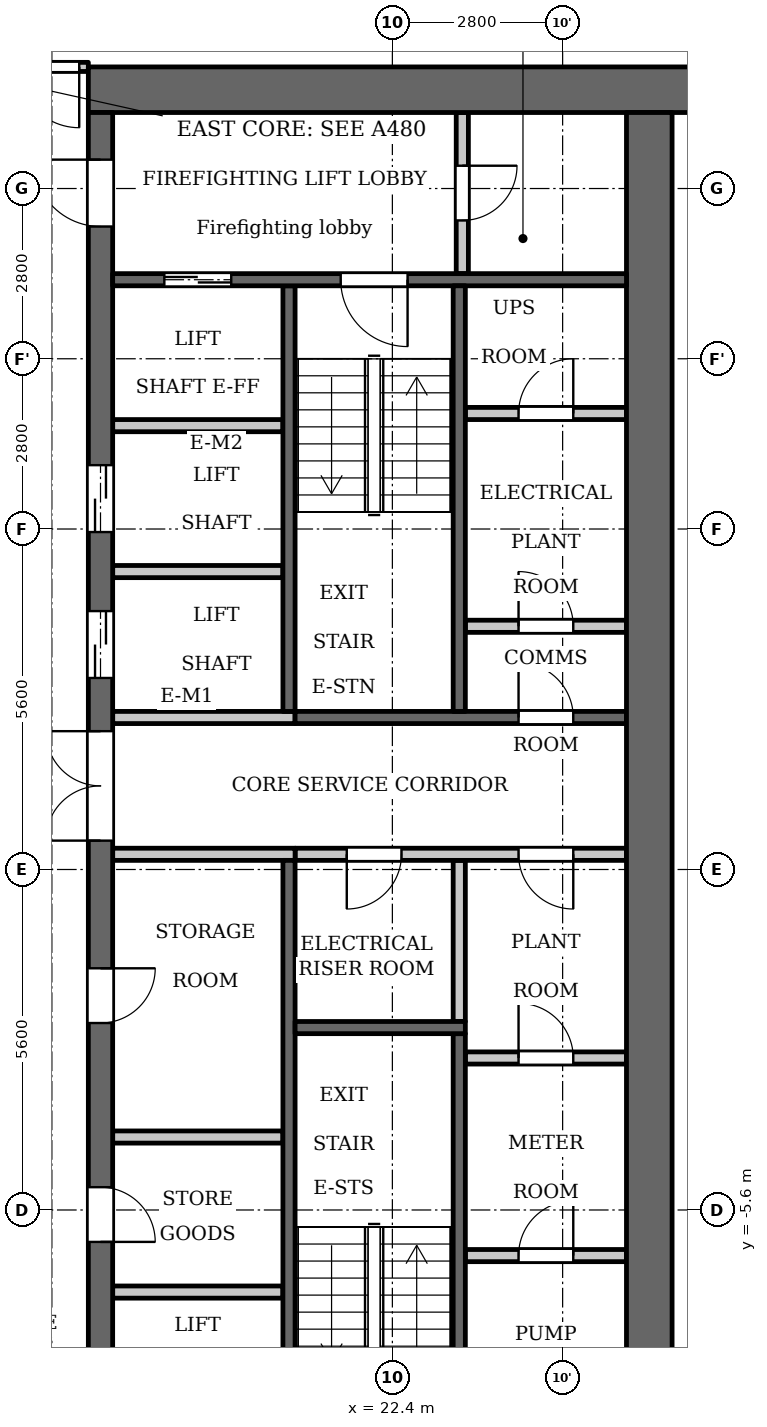
"""IFC4 building model, lengths in metres.
Left out: names, types, materials, properties, quantities, classifications, styles, units other than length and angle.
Written with IfcOpenShell. Run it as: python <this file> out.ifc"""

import sys

from ifc_helpers import new_model, si_unit, direction, frame, frame_2d, origin, place, context, subcontext, project, spatial, rectangle, extrude, element, fill, save


model = new_model("IFC4")
c1 = context("Model", 3, precision=1e-05, world=origin(), true_north=direction((0.0, 1.0)))
c2 = subcontext(c1, "Body", "Model", "MODEL_VIEW")
j1 = project(units=[si_unit("LENGTHUNIT", "METRE"), si_unit("PLANEANGLEUNIT", "RADIAN")], contexts=[c1])
p1 = place(None, origin())
s1 = spatial("IfcSite", under=j1, at=p1, CompositionType="ELEMENT")
p2 = place(p1, origin())
s2 = spatial("IfcBuilding", under=s1, at=p2, CompositionType="ELEMENT")
p3 = place(p2, frame((0.0, 0.0, 150.1)))
s3 = spatial("IfcBuildingStorey", under=s2, at=p3, CompositionType="ELEMENT", Elevation=150.1)
p4 = place(p3, frame((23.5, -2.5, 0.0), z_axis=(0.0, 0.0, 1.0), x_axis=(0.0, 1.0, 0.0)))
e1 = element("IfcWall", 1, at=p4, inside=s3, PredefinedType="PARTITIONING", context=c2, shape_type="SweptSolid", body=[
    extrude(rectangle(XDim=2.65, YDim=0.2, at=frame_2d((1.325, 0.0))), origin(), (0.0, 0.0, 1.0), 3.2),
])
p5 = place(p3, frame((20.7, 2.6, 0.0), z_axis=(0.0, 0.0, 1.0), x_axis=(0.0, 1.0, 0.0)))
e2 = element("IfcWall", 2, at=p5, inside=s3, PredefinedType="SHEAR", context=c2, shape_type="SweptSolid", body=[
    extrude(rectangle(XDim=7.0, YDim=0.2, at=frame_2d((3.5, 0.0))), origin(), (0.0, 0.0, 1.0), 3.2),
])
p6 = place(p3, frame((20.7, -9.6, 0.0), z_axis=(0.0, 0.0, 1.0), x_axis=(0.0, 1.0, 0.0)))
e3 = element("IfcWall", 3, at=p6, inside=s3, PredefinedType="SHEAR", context=c2, shape_type="SweptSolid", body=[
    extrude(rectangle(XDim=9.75, YDim=0.2, at=frame_2d((4.875, 0.0))), origin(), (0.0, 0.0, 1.0), 3.2),
])
p7 = place(p3, frame((20.8, 2.5, 0.0), z_axis=(0.0, 0.0, 1.0), x_axis=(1.0, 0.0, 0.0)))
e4 = element("IfcWall", 4, at=p7, inside=s3, PredefinedType="SHEAR", context=c2, shape_type="SweptSolid", body=[
    extrude(rectangle(XDim=5.45, YDim=0.2, at=frame_2d((2.725, 0.0))), origin(), (0.0, 0.0, 1.0), 3.2),
])
p8 = place(p7, frame((3.675, 0.0, 0.0)))
e5 = element("IfcOpeningElement", 5, at=p8, cuts=e4, PredefinedType="OPENING", context=c2, shape_type="SweptSolid", body=[
    extrude(rectangle(XDim=0.9, YDim=2.1, at=frame_2d((0.45, 1.05))), frame((0.0, 0.11, 0.0), z_axis=(0.0, -1.0, 0.0), x_axis=(1.0, 0.0, 0.0)), (0.0, 0.0, 1.0), 0.22),
])
p9 = place(p3, frame((20.8, 0.25, 0.0), z_axis=(0.0, 0.0, 1.0), x_axis=(1.0, 0.0, 0.0)))
e6 = element("IfcWall", 6, at=p9, inside=s3, PredefinedType="PARTITIONING", context=c2, shape_type="SweptSolid", body=[
    extrude(rectangle(XDim=5.45, YDim=0.2, at=frame_2d((2.725, 0.0))), origin(), (0.0, 0.0, 1.0), 3.2),
])
p10 = place(p9, frame((0.85, 0.0, 0.0)))
e7 = element("IfcOpeningElement", 7, at=p10, cuts=e6, PredefinedType="OPENING", context=c2, shape_type="SweptSolid", body=[
    extrude(rectangle(XDim=0.9, YDim=2.1, at=frame_2d((0.45, 1.05))), frame((0.0, 0.11, 0.0), z_axis=(0.0, -1.0, 0.0), x_axis=(1.0, 0.0, 0.0)), (0.0, 0.0, 1.0), 0.22),
])
p11 = place(p9, frame((3.675, 0.0, 0.0)))
e8 = element("IfcOpeningElement", 8, at=p11, cuts=e6, PredefinedType="OPENING", context=c2, shape_type="SweptSolid", body=[
    extrude(rectangle(XDim=0.9, YDim=2.1, at=frame_2d((0.45, 1.05))), frame((0.0, 0.11, 0.0), z_axis=(0.0, -1.0, 0.0), x_axis=(1.0, 0.0, 0.0)), (0.0, 0.0, 1.0), 0.22),
])
p12 = place(p3, frame((17.4, 12.825, 0.0), z_axis=(0.0, 0.0, 1.0), x_axis=(1.0, 0.0, 0.0)))
e9 = element("IfcWall", 9, at=p12, inside=s3, PredefinedType="SHEAR", context=c2, shape_type="SweptSolid", body=[
    extrude(rectangle(XDim=10.4, YDim=0.75, at=frame_2d((5.2, 0.0))), origin(), (0.0, 0.0, 1.0), 3.2),
])
p13 = place(p3, frame((17.8, -4.4, 0.0), z_axis=(0.0, 0.0, 1.0), x_axis=(1.0, 0.0, 0.0)))
e10 = element("IfcWall", 10, at=p13, inside=s3, PredefinedType="PARTITIONING", context=c2, shape_type="SweptSolid", body=[
    extrude(rectangle(XDim=2.8, YDim=0.2, at=frame_2d((1.4, 0.0))), origin(), (0.0, 0.0, 1.0), 3.2),
])
p14 = place(p3, frame((17.6, -12.45, 0.0), z_axis=(0.0, 0.0, 1.0), x_axis=(0.0, 1.0, 0.0)))
e11 = element("IfcWall", 11, at=p14, inside=s3, PredefinedType="SHEAR", context=c2, shape_type="SweptSolid", body=[
    extrude(rectangle(XDim=24.9, YDim=0.4, at=frame_2d((12.45, 0.0))), origin(), (0.0, 0.0, 1.0), 3.2),
])
p15 = place(p14, frame((6.325, 0.0, 0.0)))
e12 = element("IfcOpeningElement", 12, at=p15, cuts=e11, PredefinedType="OPENING", context=c2, shape_type="SweptSolid", body=[
    extrude(rectangle(XDim=0.9, YDim=2.1, at=frame_2d((0.45, 1.05))), frame((0.0, 0.21, 0.0), z_axis=(0.0, -1.0, 0.0), x_axis=(1.0, 0.0, 0.0)), (0.0, 0.0, 1.0), 0.42),
])
p16 = place(p14, frame((9.925, 0.0, 0.0)))
e13 = element("IfcOpeningElement", 13, at=p16, cuts=e11, PredefinedType="OPENING", context=c2, shape_type="SweptSolid", body=[
    extrude(rectangle(XDim=0.9, YDim=2.1, at=frame_2d((0.45, 1.05))), frame((0.0, 0.21, 0.0), z_axis=(0.0, -1.0, 0.0), x_axis=(1.0, 0.0, 0.0)), (0.0, 0.0, 1.0), 0.42),
])
p17 = place(p14, frame((15.6, 0.0, 0.0)))
e14 = element("IfcOpeningElement", 14, at=p17, cuts=e11, PredefinedType="OPENING", context=c2, shape_type="SweptSolid", body=[
    extrude(rectangle(XDim=1.1, YDim=2.1, at=frame_2d((0.55, 1.05))), frame((0.0, 0.21, 0.0), z_axis=(0.0, -1.0, 0.0), x_axis=(1.0, 0.0, 0.0)), (0.0, 0.0, 1.0), 0.42),
])
p18 = place(p14, frame((18.0, 0.0, 0.0)))
e15 = element("IfcOpeningElement", 15, at=p18, cuts=e11, PredefinedType="OPENING", context=c2, shape_type="SweptSolid", body=[
    extrude(rectangle(XDim=1.1, YDim=2.1, at=frame_2d((0.55, 1.05))), frame((0.0, 0.21, 0.0), z_axis=(0.0, -1.0, 0.0), x_axis=(1.0, 0.0, 0.0)), (0.0, 0.0, 1.0), 0.42),
])
p19 = place(p14, frame((23.025, 0.0, 0.0)))
e16 = element("IfcOpeningElement", 16, at=p19, cuts=e11, PredefinedType="OPENING", context=c2, shape_type="SweptSolid", body=[
    extrude(rectangle(XDim=1.1, YDim=2.1, at=frame_2d((0.55, 1.05))), frame((0.0, 0.21, 0.0), z_axis=(0.0, -1.0, 0.0), x_axis=(1.0, 0.0, 0.0)), (0.0, 0.0, 1.0), 0.42),
])
p20 = place(p14, frame((0.775, 0.0, 0.0)))
e17 = element("IfcOpeningElement", 17, at=p20, cuts=e11, PredefinedType="OPENING", context=c2, shape_type="SweptSolid", body=[
    extrude(rectangle(XDim=1.1, YDim=2.1, at=frame_2d((0.55, 1.05))), frame((0.0, 0.21, 0.0), z_axis=(0.0, -1.0, 0.0), x_axis=(1.0, 0.0, 0.0)), (0.0, 0.0, 1.0), 0.42),
])
p21 = place(p14, frame((12.925, 0.0, 0.0)))
e18 = element("IfcOpeningElement", 18, at=p21, cuts=e11, PredefinedType="OPENING", context=c2, shape_type="SweptSolid", body=[
    extrude(rectangle(XDim=1.8, YDim=2.1, at=frame_2d((0.9, 1.05))), frame((0.0, 0.21, 0.0), z_axis=(0.0, -1.0, 0.0), x_axis=(1.0, 0.0, 0.0)), (0.0, 0.0, 1.0), 0.42),
])
p22 = place(p3, frame((26.625, -12.45, 0.0), z_axis=(0.0, 0.0, 1.0), x_axis=(0.0, 1.0, 0.0)))
e19 = element("IfcWall", 19, at=p22, inside=s3, PredefinedType="SHEAR", context=c2, shape_type="SweptSolid", body=[
    extrude(rectangle(XDim=24.9, YDim=0.75, at=frame_2d((12.45, 0.0))), origin(), (0.0, 0.0, 1.0), 3.2),
])
p23 = place(p3, frame((23.55, 9.8, 0.0), z_axis=(0.0, 0.0, 1.0), x_axis=(0.0, 1.0, 0.0)))
e20 = element("IfcWall", 20, at=p23, inside=s3, PredefinedType="PARTITIONING", context=c2, shape_type="SweptSolid", body=[
    extrude(rectangle(XDim=2.65, YDim=0.2, at=frame_2d((1.325, 0.0))), origin(), (0.0, 0.0, 1.0), 3.2),
])
p24 = place(p23, frame((0.875, 0.0, 0.0)))
e21 = element("IfcOpeningElement", 21, at=p24, cuts=e20, PredefinedType="OPENING", context=c2, shape_type="SweptSolid", body=[
    extrude(rectangle(XDim=0.9, YDim=2.1, at=frame_2d((0.45, 1.05))), frame((0.0, 0.11, 0.0), z_axis=(0.0, -1.0, 0.0), x_axis=(1.0, 0.0, 0.0)), (0.0, 0.0, 1.0), 0.22),
])
p25 = place(p3, frame((23.6, -6.35, 0.0), z_axis=(0.0, 0.0, 1.0), x_axis=(1.0, 0.0, 0.0)))
e22 = element("IfcWall", 22, at=p25, inside=s3, PredefinedType="PARTITIONING", context=c2, shape_type="SweptSolid", body=[
    extrude(rectangle(XDim=2.65, YDim=0.2, at=frame_2d((1.325, 0.0))), origin(), (0.0, 0.0, 1.0), 3.2),
])
p26 = place(p25, frame((0.875, 0.0, 0.0)))
e23 = element("IfcOpeningElement", 23, at=p26, cuts=e22, PredefinedType="OPENING", context=c2, shape_type="SweptSolid", body=[
    extrude(rectangle(XDim=0.9, YDim=2.1, at=frame_2d((0.45, 1.05))), frame((0.0, 0.11, 0.0), z_axis=(0.0, -1.0, 0.0), x_axis=(1.0, 0.0, 0.0)), (0.0, 0.0, 1.0), 0.22),
])
p27 = place(p3, frame((23.6, -3.1, 0.0), z_axis=(0.0, 0.0, 1.0), x_axis=(1.0, 0.0, 0.0)))
e24 = element("IfcWall", 24, at=p27, inside=s3, PredefinedType="PARTITIONING", context=c2, shape_type="SweptSolid", body=[
    extrude(rectangle(XDim=2.65, YDim=0.2, at=frame_2d((1.325, 0.0))), origin(), (0.0, 0.0, 1.0), 3.2),
])
p28 = place(p27, frame((0.875, 0.0, 0.0)))
e25 = element("IfcOpeningElement", 25, at=p28, cuts=e24, PredefinedType="OPENING", context=c2, shape_type="SweptSolid", body=[
    extrude(rectangle(XDim=0.9, YDim=2.1, at=frame_2d((0.45, 1.05))), frame((0.0, 0.11, 0.0), z_axis=(0.0, -1.0, 0.0), x_axis=(1.0, 0.0, 0.0)), (0.0, 0.0, 1.0), 0.22),
])
p29 = place(p3, frame((23.6, 4.0, 0.0), z_axis=(0.0, 0.0, 1.0), x_axis=(1.0, 0.0, 0.0)))
e26 = element("IfcWall", 26, at=p29, inside=s3, PredefinedType="PARTITIONING", context=c2, shape_type="SweptSolid", body=[
    extrude(rectangle(XDim=2.65, YDim=0.2, at=frame_2d((1.325, 0.0))), origin(), (0.0, 0.0, 1.0), 3.2),
])
p30 = place(p29, frame((0.875, 0.0, 0.0)))
e27 = element("IfcOpeningElement", 27, at=p30, cuts=e26, PredefinedType="OPENING", context=c2, shape_type="SweptSolid", body=[
    extrude(rectangle(XDim=0.9, YDim=2.1, at=frame_2d((0.45, 1.05))), frame((0.0, 0.11, 0.0), z_axis=(0.0, -1.0, 0.0), x_axis=(1.0, 0.0, 0.0)), (0.0, 0.0, 1.0), 0.22),
])
p31 = place(p3, frame((23.6, 7.5, 0.0), z_axis=(0.0, 0.0, 1.0), x_axis=(1.0, 0.0, 0.0)))
e28 = element("IfcWall", 28, at=p31, inside=s3, PredefinedType="PARTITIONING", context=c2, shape_type="SweptSolid", body=[
    extrude(rectangle(XDim=2.65, YDim=0.2, at=frame_2d((1.325, 0.0))), origin(), (0.0, 0.0, 1.0), 3.2),
])
p32 = place(p31, frame((0.875, 0.0, 0.0)))
e29 = element("IfcOpeningElement", 29, at=p32, cuts=e28, PredefinedType="OPENING", context=c2, shape_type="SweptSolid", body=[
    extrude(rectangle(XDim=0.9, YDim=2.1, at=frame_2d((0.45, 1.05))), frame((0.0, 0.11, 0.0), z_axis=(0.0, -1.0, 0.0), x_axis=(1.0, 0.0, 0.0)), (0.0, 0.0, 1.0), 0.22),
])
p33 = place(p3, frame((17.8, -6.95, 0.0), z_axis=(0.0, 0.0, 1.0), x_axis=(1.0, 0.0, 0.0)))
e30 = element("IfcWall", 30, at=p33, inside=s3, PredefinedType="PARTITIONING", context=c2, shape_type="SweptSolid", body=[
    extrude(rectangle(XDim=2.8, YDim=0.2, at=frame_2d((1.4, 0.0))), origin(), (0.0, 0.0, 1.0), 3.2),
])
for number, where, z_axis, x_axis in (
    (31, (17.8, 0.25, 0.0), (0.0, 0.0, 1.0), (1.0, 0.0, 0.0)),
    (32, (17.8, 2.5, 0.0), (0.0, 0.0, 1.0), (1.0, 0.0, 0.0)),
):
    element("IfcWall", number, at=place(p3, frame(where, z_axis=z_axis, x_axis=x_axis)), inside=s3, PredefinedType="PARTITIONING", context=c2, shape_type="SweptSolid", body=[
        extrude(rectangle(XDim=3.0, YDim=0.2, at=frame_2d((1.5, 0.0))), origin(), (0.0, 0.0, 1.0), 3.2),
    ])
for number, where, z_axis, x_axis in (
    (33, (17.8, 4.9, 0.0), (0.0, 0.0, 1.0), (1.0, 0.0, 0.0)),
    (34, (17.8, 7.3, 0.0), (0.0, 0.0, 1.0), (1.0, 0.0, 0.0)),
):
    element("IfcWall", number, at=place(p3, frame(where, z_axis=z_axis, x_axis=x_axis)), inside=s3, PredefinedType="PARTITIONING", context=c2, shape_type="SweptSolid", body=[
        extrude(rectangle(XDim=2.8, YDim=0.2, at=frame_2d((1.4, 0.0))), origin(), (0.0, 0.0, 1.0), 3.2),
    ])
p34 = place(p3, frame((17.8, 9.7, 0.0), z_axis=(0.0, 0.0, 1.0), x_axis=(1.0, 0.0, 0.0)))
e35 = element("IfcWall", 35, at=p34, inside=s3, PredefinedType="SHEAR", context=c2, shape_type="SweptSolid", body=[
    extrude(rectangle(XDim=8.45, YDim=0.2, at=frame_2d((4.225, 0.0))), origin(), (0.0, 0.0, 1.0), 3.2),
])
p35 = place(p34, frame((0.85, 0.0, 0.0)))
e36 = element("IfcOpeningElement", 36, at=p35, cuts=e35, PredefinedType="OPENING", context=c2, shape_type="SweptSolid", body=[
    extrude(rectangle(XDim=1.1, YDim=2.1, at=frame_2d((0.55, 1.05))), frame((0.0, 0.11, 0.0), z_axis=(0.0, -1.0, 0.0), x_axis=(1.0, 0.0, 0.0)), (0.0, 0.0, 1.0), 0.22),
])
p36 = place(p34, frame((3.75, 0.0, 0.0)))
e37 = element("IfcOpeningElement", 37, at=p36, cuts=e35, PredefinedType="OPENING", context=c2, shape_type="SweptSolid", body=[
    extrude(rectangle(XDim=1.1, YDim=2.1, at=frame_2d((0.55, 1.05))), frame((0.0, 0.11, 0.0), z_axis=(0.0, -1.0, 0.0), x_axis=(1.0, 0.0, 0.0)), (0.0, 0.0, 1.0), 0.22),
])
p37 = place(p3, frame((23.5, 2.6, 0.0), z_axis=(0.0, 0.0, 1.0), x_axis=(0.0, 1.0, 0.0)))
e38 = element("IfcWall", 38, at=p37, inside=s3, PredefinedType="SHEAR", context=c2, shape_type="SweptSolid", body=[
    extrude(rectangle(XDim=7.0, YDim=0.2, at=frame_2d((3.5, 0.0))), origin(), (0.0, 0.0, 1.0), 3.2),
])
p38 = place(p3, frame((23.5, -9.6, 0.0), z_axis=(0.0, 0.0, 1.0), x_axis=(0.0, 1.0, 0.0)))
e39 = element("IfcWall", 39, at=p38, inside=s3, PredefinedType="SHEAR", context=c2, shape_type="SweptSolid", body=[
    extrude(rectangle(XDim=6.9, YDim=0.2, at=frame_2d((3.45, 0.0))), origin(), (0.0, 0.0, 1.0), 3.2),
])
p39 = place(p3, frame((20.8, -2.6, 0.0), z_axis=(0.0, 0.0, 1.0), x_axis=(1.0, 0.0, 0.0)))
e40 = element("IfcWall", 40, at=p39, inside=s3, PredefinedType="SHEAR", context=c2, shape_type="SweptSolid", body=[
    extrude(rectangle(XDim=2.8, YDim=0.2, at=frame_2d((1.4, 0.0))), origin(), (0.0, 0.0, 1.0), 3.2),
])
p40 = place(p3, frame((-17.4, 13.2, 0.0), z_axis=(0.0, 0.0, 1.0), x_axis=(1.0, 0.0, 0.0)))
e41 = element("IfcWall", 41, at=p40, inside=s3, PredefinedType="PARTITIONING", context=c2, shape_type="SweptSolid", body=[
    extrude(rectangle(XDim=34.8, YDim=0.15, at=frame_2d((17.4, 0.0))), origin(), (0.0, 0.0, 1.0), 3.2),
])
p41 = place(p40, frame((0.25, 0.0, 0.0)))
e42 = element("IfcOpeningElement", 42, at=p41, cuts=e41, PredefinedType="OPENING", context=c2, shape_type="SweptSolid", body=[
    extrude(rectangle(XDim=1.0, YDim=2.1, at=frame_2d((0.5, 1.05))), frame((0.0, 0.085, 0.0), z_axis=(0.0, -1.0, 0.0), x_axis=(1.0, 0.0, 0.0)), (0.0, 0.0, 1.0), 0.17),
])
p42 = place(p40, frame((33.65, 0.0, 0.0)))
e43 = element("IfcOpeningElement", 43, at=p42, cuts=e41, PredefinedType="OPENING", context=c2, shape_type="SweptSolid", body=[
    extrude(rectangle(XDim=1.0, YDim=2.1, at=frame_2d((0.5, 1.05))), frame((0.0, 0.085, 0.0), z_axis=(0.0, -1.0, 0.0), x_axis=(1.0, 0.0, 0.0)), (0.0, 0.0, 1.0), 0.17),
])
p43 = place(p40, frame((13.75, 0.0, 0.0)))
e44 = element("IfcOpeningElement", 44, at=p43, cuts=e41, PredefinedType="OPENING", context=c2, shape_type="SweptSolid", body=[
    extrude(rectangle(XDim=1.0, YDim=2.1, at=frame_2d((0.5, 1.05))), frame((0.0, 0.085, 0.0), z_axis=(0.0, -1.0, 0.0), x_axis=(1.0, 0.0, 0.0)), (0.0, 0.0, 1.0), 0.17),
])
p44 = place(p15, origin())
e45 = element("IfcDoor", 45, at=p44, inside=s3, OperationType="SINGLE_SWING_LEFT", PredefinedType="DOOR", context=c2, shape_type="SweptSolid", body=[
    extrude(rectangle(XDim=0.9, YDim=2.1, at=frame_2d((0.45, 1.05))), frame((0.0, 0.025, 0.0), z_axis=(0.0, -1.0, 0.0), x_axis=(1.0, 0.0, 0.0)), (0.0, 0.0, 1.0), 0.05),
])
fill(e12, e45)
p45 = place(p16, origin())
e46 = element("IfcDoor", 46, at=p45, inside=s3, OperationType="SINGLE_SWING_RIGHT", PredefinedType="DOOR", context=c2, shape_type="SweptSolid", body=[
    extrude(rectangle(XDim=0.9, YDim=2.1, at=frame_2d((0.45, 1.05))), frame((0.0, 0.025, 0.0), z_axis=(0.0, -1.0, 0.0), x_axis=(1.0, 0.0, 0.0)), (0.0, 0.0, 1.0), 0.05),
])
fill(e13, e46)
p46 = place(p17, origin())
e47 = element("IfcDoor", 47, at=p46, inside=s3, OperationType="DOUBLE_DOOR_SLIDING", PredefinedType="DOOR", context=c2, shape_type="SweptSolid", body=[
    extrude(rectangle(XDim=1.1, YDim=2.1, at=frame_2d((0.55, 1.05))), frame((0.0, 0.025, 0.0), z_axis=(0.0, -1.0, 0.0), x_axis=(1.0, 0.0, 0.0)), (0.0, 0.0, 1.0), 0.05),
])
fill(e14, e47)
p47 = place(p18, origin())
e48 = element("IfcDoor", 48, at=p47, inside=s3, OperationType="DOUBLE_DOOR_SLIDING", PredefinedType="DOOR", context=c2, shape_type="SweptSolid", body=[
    extrude(rectangle(XDim=1.1, YDim=2.1, at=frame_2d((0.55, 1.05))), frame((0.0, 0.025, 0.0), z_axis=(0.0, -1.0, 0.0), x_axis=(1.0, 0.0, 0.0)), (0.0, 0.0, 1.0), 0.05),
])
fill(e15, e48)
p48 = place(p35, origin())
e49 = element("IfcDoor", 49, at=p48, inside=s3, OperationType="DOUBLE_DOOR_SLIDING", PredefinedType="DOOR", context=c2, shape_type="SweptSolid", body=[
    extrude(rectangle(XDim=1.1, YDim=2.1, at=frame_2d((0.55, 1.05))), frame((0.0, 0.025, 0.0), z_axis=(0.0, -1.0, 0.0), x_axis=(1.0, 0.0, 0.0)), (0.0, 0.0, 1.0), 0.05),
])
fill(e36, e49)
p49 = place(p19, origin())
e50 = element("IfcDoor", 50, at=p49, inside=s3, OperationType="SINGLE_SWING_LEFT", PredefinedType="DOOR", context=c2, shape_type="SweptSolid", body=[
    extrude(rectangle(XDim=1.1, YDim=2.1, at=frame_2d((0.55, 1.05))), frame((0.0, 0.025, 0.0), z_axis=(0.0, -1.0, 0.0), x_axis=(1.0, 0.0, 0.0)), (0.0, 0.0, 1.0), 0.05),
])
fill(e16, e50)
p50 = place(p24, origin())
e51 = element("IfcDoor", 51, at=p50, inside=s3, OperationType="SINGLE_SWING_RIGHT", PredefinedType="DOOR", context=c2, shape_type="SweptSolid", body=[
    extrude(rectangle(XDim=0.9, YDim=2.1, at=frame_2d((0.45, 1.05))), frame((0.0, 0.025, 0.0), z_axis=(0.0, -1.0, 0.0), x_axis=(1.0, 0.0, 0.0)), (0.0, 0.0, 1.0), 0.05),
])
fill(e21, e51)
p51 = place(p36, origin())
e52 = element("IfcDoor", 52, at=p51, inside=s3, OperationType="SINGLE_SWING_RIGHT", PredefinedType="DOOR", context=c2, shape_type="SweptSolid", body=[
    extrude(rectangle(XDim=1.1, YDim=2.1, at=frame_2d((0.55, 1.05))), frame((0.0, 0.025, 0.0), z_axis=(0.0, -1.0, 0.0), x_axis=(1.0, 0.0, 0.0)), (0.0, 0.0, 1.0), 0.05),
])
fill(e37, e52)
p52 = place(p21, origin())
e53 = element("IfcDoor", 53, at=p52, inside=s3, OperationType="DOUBLE_DOOR_SINGLE_SWING", PredefinedType="DOOR", context=c2, shape_type="SweptSolid", body=[
    extrude(rectangle(XDim=1.8, YDim=2.1, at=frame_2d((0.9, 1.05))), frame((0.0, 0.025, 0.0), z_axis=(0.0, -1.0, 0.0), x_axis=(1.0, 0.0, 0.0)), (0.0, 0.0, 1.0), 0.05),
])
fill(e18, e53)
p53 = place(p10, origin())
e54 = element("IfcDoor", 54, at=p53, inside=s3, OperationType="SINGLE_SWING_LEFT", PredefinedType="DOOR", context=c2, shape_type="SweptSolid", body=[
    extrude(rectangle(XDim=0.9, YDim=2.1, at=frame_2d((0.45, 1.05))), frame((0.0, 0.025, 0.0), z_axis=(0.0, -1.0, 0.0), x_axis=(1.0, 0.0, 0.0)), (0.0, 0.0, 1.0), 0.05),
])
fill(e7, e54)
p54 = place(p26, origin())
e55 = element("IfcDoor", 55, at=p54, inside=s3, OperationType="SINGLE_SWING_LEFT", PredefinedType="DOOR", context=c2, shape_type="SweptSolid", body=[
    extrude(rectangle(XDim=0.9, YDim=2.1, at=frame_2d((0.45, 1.05))), frame((0.0, 0.025, 0.0), z_axis=(0.0, -1.0, 0.0), x_axis=(1.0, 0.0, 0.0)), (0.0, 0.0, 1.0), 0.05),
])
fill(e23, e55)
p55 = place(p28, origin())
e56 = element("IfcDoor", 56, at=p55, inside=s3, OperationType="SINGLE_SWING_RIGHT", PredefinedType="DOOR", context=c2, shape_type="SweptSolid", body=[
    extrude(rectangle(XDim=0.9, YDim=2.1, at=frame_2d((0.45, 1.05))), frame((0.0, 0.025, 0.0), z_axis=(0.0, -1.0, 0.0), x_axis=(1.0, 0.0, 0.0)), (0.0, 0.0, 1.0), 0.05),
])
fill(e25, e56)
p56 = place(p11, origin())
e57 = element("IfcDoor", 57, at=p56, inside=s3, OperationType="SINGLE_SWING_RIGHT", PredefinedType="DOOR", context=c2, shape_type="SweptSolid", body=[
    extrude(rectangle(XDim=0.9, YDim=2.1, at=frame_2d((0.45, 1.05))), frame((0.0, 0.025, 0.0), z_axis=(0.0, -1.0, 0.0), x_axis=(1.0, 0.0, 0.0)), (0.0, 0.0, 1.0), 0.05),
])
fill(e8, e57)
p57 = place(p30, origin())
e58 = element("IfcDoor", 58, at=p57, inside=s3, OperationType="SINGLE_SWING_RIGHT", PredefinedType="DOOR", context=c2, shape_type="SweptSolid", body=[
    extrude(rectangle(XDim=0.9, YDim=2.1, at=frame_2d((0.45, 1.05))), frame((0.0, 0.025, 0.0), z_axis=(0.0, -1.0, 0.0), x_axis=(1.0, 0.0, 0.0)), (0.0, 0.0, 1.0), 0.05),
])
fill(e27, e58)
p58 = place(p32, origin())
e59 = element("IfcDoor", 59, at=p58, inside=s3, OperationType="SINGLE_SWING_LEFT", PredefinedType="DOOR", context=c2, shape_type="SweptSolid", body=[
    extrude(rectangle(XDim=0.9, YDim=2.1, at=frame_2d((0.45, 1.05))), frame((0.0, 0.025, 0.0), z_axis=(0.0, -1.0, 0.0), x_axis=(1.0, 0.0, 0.0)), (0.0, 0.0, 1.0), 0.05),
])
fill(e29, e59)
p59 = place(p8, origin())
e60 = element("IfcDoor", 60, at=p59, inside=s3, OperationType="SINGLE_SWING_RIGHT", PredefinedType="DOOR", context=c2, shape_type="SweptSolid", body=[
    extrude(rectangle(XDim=0.9, YDim=2.1, at=frame_2d((0.45, 1.05))), frame((0.0, 0.025, 0.0), z_axis=(0.0, -1.0, 0.0), x_axis=(1.0, 0.0, 0.0)), (0.0, 0.0, 1.0), 0.05),
])
fill(e5, e60)
p60 = place(p42, origin())
e61 = element("IfcDoor", 61, at=p60, inside=s3, OperationType="SINGLE_SWING_RIGHT", PredefinedType="DOOR", context=c2, shape_type="SweptSolid", body=[
    extrude(rectangle(XDim=1.0, YDim=2.1, at=frame_2d((0.5, 1.05))), frame((0.0, 0.025, 0.0), z_axis=(0.0, -1.0, 0.0), x_axis=(1.0, 0.0, 0.0)), (0.0, 0.0, 1.0), 0.05),
])
fill(e43, e61)
save(model, sys.argv[1])
